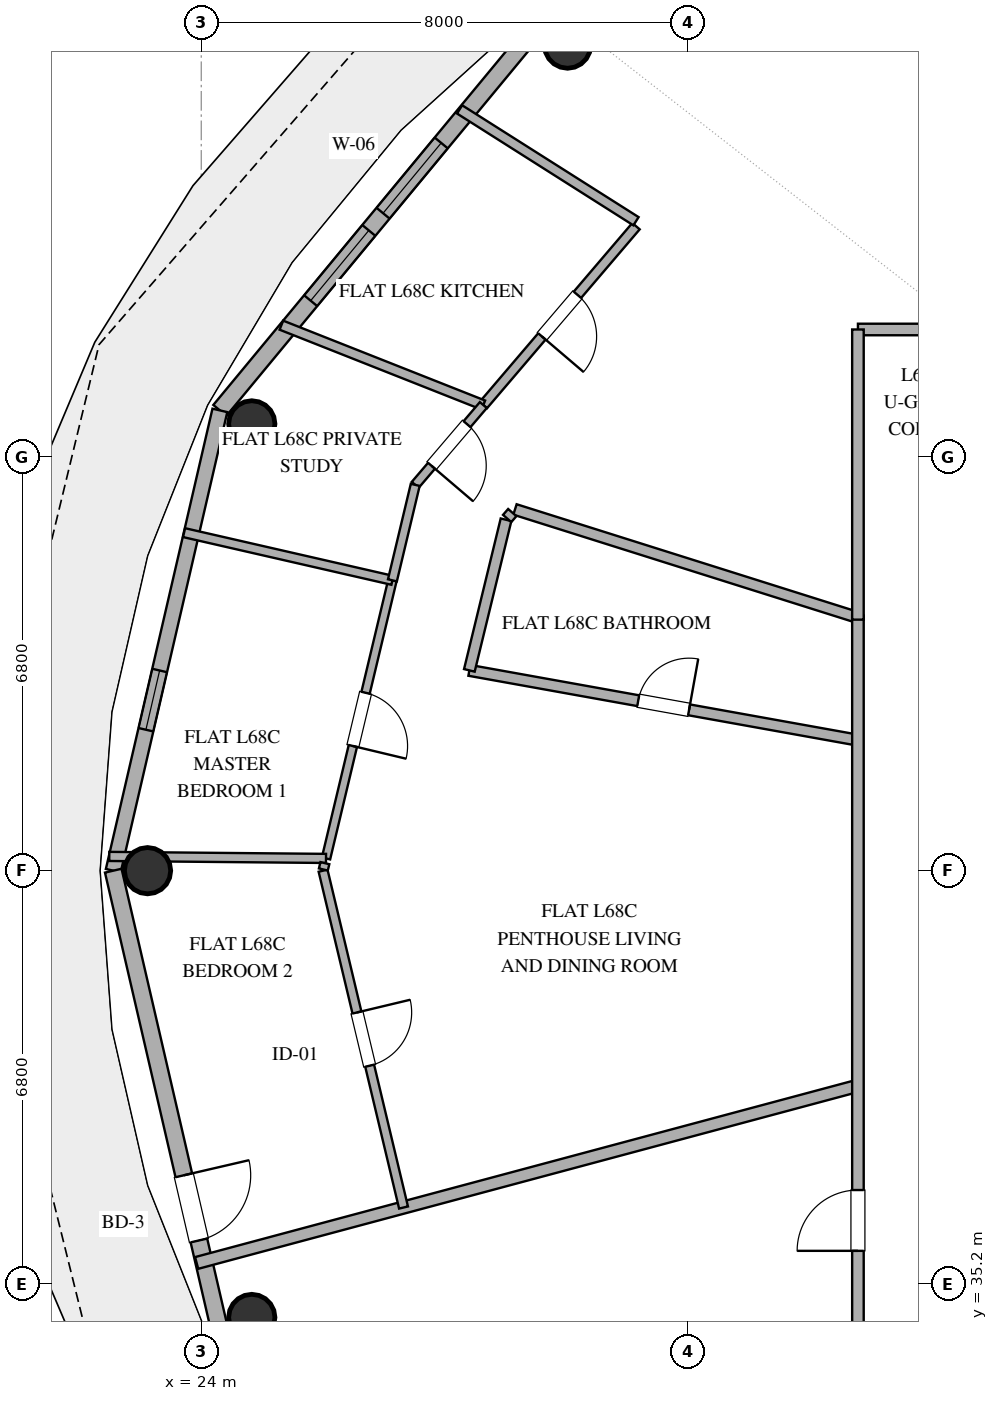
"""IFC4 building model, lengths in metres.
Left out: names, types, materials, properties, quantities, classifications, styles, units other than length and angle.
Written with IfcOpenShell. Run it as: python <this file> out.ifc"""

import sys

from ifc_helpers import new_model, si_unit, direction, frame, frame_2d, origin, origin_2d, place, context, subcontext, project, spatial, rectangle, hollow_circle, extrude, element, fill, save


model = new_model("IFC4")
c1 = context("Model", 3, precision=1e-05, world=origin(), true_north=direction((0.0, 1.0)))
c2 = subcontext(c1, "Body", "Model", "MODEL_VIEW")
j1 = project(units=[si_unit("LENGTHUNIT", "METRE"), si_unit("PLANEANGLEUNIT", "RADIAN")], contexts=[c1])
p1 = place(None, origin())
s1 = spatial("IfcSite", under=j1, at=p1, CompositionType="ELEMENT")
p2 = place(p1, origin())
s2 = spatial("IfcBuilding", under=s1, at=p2, CompositionType="ELEMENT")
p3 = place(p2, frame((0.0, 0.0, 265.8)))
s3 = spatial("IfcBuildingStorey", under=s2, at=p3, CompositionType="ELEMENT", Elevation=265.8)
for number, where, z_axis, x_axis in (
    (1, (30.025, 55.576, 0.0), (0.0, 0.0, 1.0), (1.0, 0.0, 0.0)),
    (2, (24.831, 49.347, 0.0), (0.0, 0.0, 1.0), (1.0, 0.0, 0.0)),
    (3, (23.117, 42.0, 0.0), (0.0, 0.0, 1.0), (1.0, 0.0, 0.0)),
    (4, (24.831, 34.653, 0.0), (0.0, 0.0, 1.0), (1.0, 0.0, 0.0)),
):
    element("IfcColumn", number, at=place(p3, frame(where, z_axis=z_axis, x_axis=x_axis)), inside=s3, PredefinedType="COLUMN", context=c2, shape_type="SweptSolid", body=[
        extrude(hollow_circle(Radius=0.381, WallThickness=0.025, at=origin_2d()), origin(), (0.0, 0.0, 1.0), 3.37),
    ])
p4 = place(p3, frame((29.617, 55.987, 0.0), z_axis=(0.0, 0.0, 1.0), x_axis=(-0.63761509934, -0.770355103243, 0.0)))
e5 = element("IfcWall", 5, at=p4, inside=s3, PredefinedType="SOLIDWALL", context=c2, shape_type="SweptSolid", body=[
    extrude(rectangle(XDim=8.33, YDim=0.28, at=frame_2d((4.165, 0.0))), origin(), (0.0, 0.0, 1.0), 3.37),
])
p5 = place(p4, frame((2.621, 0.0, 0.85)))
e6 = element("IfcOpeningElement", 6, at=p5, cuts=e5, PredefinedType="OPENING", context=c2, shape_type="SweptSolid", body=[
    extrude(rectangle(XDim=1.5, YDim=2.0, at=frame_2d((0.75, 1.0))), frame((0.0, 0.15, 0.0), z_axis=(0.0, -1.0, 0.0), x_axis=(1.0, 0.0, 0.0)), (0.0, 0.0, 1.0), 0.3),
])
p6 = place(p4, frame((4.488, 0.0, 0.85)))
e7 = element("IfcOpeningElement", 7, at=p6, cuts=e5, PredefinedType="OPENING", context=c2, shape_type="SweptSolid", body=[
    extrude(rectangle(XDim=1.5, YDim=2.0, at=frame_2d((0.75, 1.0))), frame((0.0, 0.15, 0.0), z_axis=(0.0, -1.0, 0.0), x_axis=(1.0, 0.0, 0.0)), (0.0, 0.0, 1.0), 0.3),
])
p7 = place(p3, frame((24.306, 49.57, 0.0), z_axis=(0.0, 0.0, 1.0), x_axis=(-0.225635078214, -0.974211892495, 0.0)))
e8 = element("IfcWall", 8, at=p7, inside=s3, PredefinedType="SOLIDWALL", context=c2, shape_type="SweptSolid", body=[
    extrude(rectangle(XDim=7.77, YDim=0.25, at=frame_2d((3.885, 0.0))), origin(), (0.0, 0.0, 1.0), 3.37),
])
p8 = place(p7, frame((4.391, 0.0, 0.35)))
e9 = element("IfcOpeningElement", 9, at=p8, cuts=e8, PredefinedType="OPENING", context=c2, shape_type="SweptSolid", body=[
    extrude(rectangle(XDim=1.0, YDim=1.05, at=frame_2d((0.5, 0.525))), frame((0.0, 0.135, 0.0), z_axis=(0.0, -1.0, 0.0), x_axis=(1.0, 0.0, 0.0)), (0.0, 0.0, 1.0), 0.27),
])
p9 = place(p3, frame((22.553, 42.0, 0.0), z_axis=(0.0, 0.0, 1.0), x_axis=(0.225635078214, -0.974211892495, 0.0)))
e10 = element("IfcWall", 10, at=p9, inside=s3, PredefinedType="SOLIDWALL", context=c2, shape_type="SweptSolid", body=[
    extrude(rectangle(XDim=7.77, YDim=0.28, at=frame_2d((3.885, 0.0))), origin(), (0.0, 0.0, 1.0), 3.37),
])
p10 = place(p9, frame((5.142, 0.0, 0.0)))
e11 = element("IfcOpeningElement", 11, at=p10, cuts=e10, PredefinedType="OPENING", context=c2, shape_type="SweptSolid", body=[
    extrude(rectangle(XDim=1.1, YDim=2.25, at=frame_2d((0.55, 1.125))), frame((0.0, 0.15, 0.0), z_axis=(0.0, -1.0, 0.0), x_axis=(1.0, 0.0, 0.0)), (0.0, 0.0, 1.0), 0.3),
])
p11 = place(p3, frame((34.8, 50.9, 0.0), z_axis=(0.0, 0.0, 1.0), x_axis=(1.0, 0.0, 0.0)))
e12 = element("IfcWall", 12, at=p11, inside=s3, PredefinedType="PARTITIONING", context=c2, shape_type="SweptSolid", body=[
    extrude(rectangle(XDim=16.473, YDim=0.19, at=frame_2d((8.237, 0.0))), origin(), (0.0, 0.0, 1.0), 2.73),
])
p12 = place(p11, frame((10.196, 0.0, 0.0)))
e13 = element("IfcOpeningElement", 13, at=p12, cuts=e12, PredefinedType="OPENING", context=c2, shape_type="SweptSolid", body=[
    extrude(rectangle(XDim=1.0, YDim=2.2, at=frame_2d((0.5, 1.1))), frame((0.0, 0.105, 0.0), z_axis=(0.0, -1.0, 0.0), x_axis=(1.0, 0.0, 0.0)), (0.0, 0.0, 1.0), 0.21),
])
p13 = place(p11, frame((2.387, 0.0, 0.0)))
e14 = element("IfcOpeningElement", 14, at=p13, cuts=e12, PredefinedType="OPENING", context=c2, shape_type="SweptSolid", body=[
    extrude(rectangle(XDim=1.0, YDim=2.2, at=frame_2d((0.5, 1.1))), frame((0.0, 0.105, 0.0), z_axis=(0.0, -1.0, 0.0), x_axis=(1.0, 0.0, 0.0)), (0.0, 0.0, 1.0), 0.21),
])
p14 = place(p3, frame((23.924, 35.549, 0.0), z_axis=(0.0, 0.0, 1.0), x_axis=(0.965923661364, 0.258827124578, 0.0)))
e15 = element("IfcWall", 15, at=p14, inside=s3, PredefinedType="PARTITIONING", context=c2, shape_type="SweptSolid", body=[
    extrude(rectangle(XDim=11.26, YDim=0.2, at=frame_2d((5.63, 0.0))), origin(), (0.0, 0.0, 1.0), 2.73),
])
p15 = place(p3, frame((28.409, 45.294, 0.0), z_axis=(0.0, 0.0, 1.0), x_axis=(0.984253263435, -0.176764004867, 0.0)))
e16 = element("IfcWall", 16, at=p15, inside=s3, PredefinedType="PLUMBINGWALL", context=c2, shape_type="SweptSolid", body=[
    extrude(rectangle(XDim=6.493, YDim=0.18, at=frame_2d((3.247, 0.0))), origin(), (0.0, 0.0, 1.0), 2.73),
])
p16 = place(p15, frame((2.821, 0.0, 0.0)))
e17 = element("IfcOpeningElement", 17, at=p16, cuts=e16, PredefinedType="OPENING", context=c2, shape_type="SweptSolid", body=[
    extrude(rectangle(XDim=0.85, YDim=2.1, at=frame_2d((0.425, 1.05))), frame((0.0, 0.1, 0.0), z_axis=(0.0, -1.0, 0.0), x_axis=(1.0, 0.0, 0.0)), (0.0, 0.0, 1.0), 0.2),
])
p17 = place(p3, frame((40.532, 50.9, 0.0), z_axis=(0.0, 0.0, 1.0), x_axis=(-0.642777155779, 0.766053214868, 0.0)))
e18 = element("IfcWall", 18, at=p17, inside=s3, PredefinedType="PARTITIONING", context=c2, shape_type="SweptSolid", body=[
    extrude(rectangle(XDim=9.868, YDim=0.2, at=frame_2d((4.934, 0.0))), origin(), (0.0, 0.0, 1.0), 2.73),
])
p18 = place(p3, frame((34.8, 46.162, 0.0), z_axis=(0.0, 0.0, 1.0), x_axis=(-0.953717336958, 0.3007045746, 0.0)))
e19 = element("IfcWall", 19, at=p18, inside=s3, PredefinedType="PLUMBINGWALL", context=c2, shape_type="SweptSolid", body=[
    extrude(rectangle(XDim=5.914, YDim=0.18, at=frame_2d((2.957, 0.0))), origin(), (0.0, 0.0, 1.0), 2.73),
])
p19 = place(p3, frame((34.8, 34.0, 0.0), z_axis=(0.0, 0.0, 1.0), x_axis=(0.0, 1.0, 0.0)))
e20 = element("IfcWall", 20, at=p19, inside=s3, PredefinedType="PARTITIONING", context=c2, shape_type="SweptSolid", body=[
    extrude(rectangle(XDim=12.196, YDim=0.19, at=frame_2d((6.098, 0.0))), origin(), (0.0, 0.0, 1.0), 2.73),
])
p20 = place(p19, frame((1.748, 0.0, 0.0)))
e21 = element("IfcOpeningElement", 21, at=p20, cuts=e20, PredefinedType="OPENING", context=c2, shape_type="SweptSolid", body=[
    extrude(rectangle(XDim=1.0, YDim=2.2, at=frame_2d((0.5, 1.1))), frame((0.0, 0.105, 0.0), z_axis=(0.0, -1.0, 0.0), x_axis=(1.0, 0.0, 0.0)), (0.0, 0.0, 1.0), 0.21),
])
p21 = place(p3, frame((26.004, 42.0, 0.0), z_axis=(0.0, 0.0, 1.0), x_axis=(0.232304342064, -0.972643147644, 0.0)))
e22 = element("IfcWall", 22, at=p21, inside=s3, PredefinedType="PARTITIONING", context=c2, shape_type="SweptSolid", body=[
    extrude(rectangle(XDim=5.695, YDim=0.15, at=frame_2d((2.848, 0.0))), origin(), (0.0, 0.0, 1.0), 2.73),
])
p22 = place(p21, frame((2.398, 0.0, 0.0)))
e23 = element("IfcOpeningElement", 23, at=p22, cuts=e22, PredefinedType="OPENING", context=c2, shape_type="SweptSolid", body=[
    extrude(rectangle(XDim=0.9, YDim=2.1, at=frame_2d((0.45, 1.05))), frame((0.0, 0.085, 0.0), z_axis=(0.0, -1.0, 0.0), x_axis=(1.0, 0.0, 0.0)), (0.0, 0.0, 1.0), 0.17),
])
p23 = place(p3, frame((34.8, 46.128, 0.0), z_axis=(0.0, 0.0, 1.0), x_axis=(0.0, 1.0, 0.0)))
e24 = element("IfcWall", 24, at=p23, inside=s3, PredefinedType="PARTITIONING", context=c2, shape_type="SweptSolid", body=[
    extrude(rectangle(XDim=4.771, YDim=0.19, at=frame_2d((2.386, 0.0))), origin(), (0.0, 0.0, 1.0), 2.73),
])
p24 = place(p3, frame((27.144, 46.775, 0.0), z_axis=(0.0, 0.0, 1.0), x_axis=(-0.232320140936, -0.972639374134, 0.0)))
e25 = element("IfcWall", 25, at=p24, inside=s3, PredefinedType="PARTITIONING", context=c2, shape_type="SweptSolid", body=[
    extrude(rectangle(XDim=4.702, YDim=0.14, at=frame_2d((2.351, 0.0))), origin(), (0.0, 0.0, 1.0), 2.73),
])
p25 = place(p24, frame((1.901, 0.0, 0.0)))
e26 = element("IfcOpeningElement", 26, at=p25, cuts=e25, PredefinedType="OPENING", context=c2, shape_type="SweptSolid", body=[
    extrude(rectangle(XDim=0.9, YDim=2.1, at=frame_2d((0.45, 1.05))), frame((0.0, 0.08, 0.0), z_axis=(0.0, -1.0, 0.0), x_axis=(1.0, 0.0, 0.0)), (0.0, 0.0, 1.0), 0.16),
])
p26 = place(p3, frame((31.15, 52.599, 0.0), z_axis=(0.0, 0.0, 1.0), x_axis=(-0.649199141965, -0.760618481285, 0.0)))
e27 = element("IfcWall", 27, at=p26, inside=s3, PredefinedType="PLUMBINGWALL", context=c2, shape_type="SweptSolid", body=[
    extrude(rectangle(XDim=3.867, YDim=0.16, at=frame_2d((1.934, 0.0))), origin(), (0.0, 0.0, 1.0), 2.73),
])
p27 = place(p26, frame((1.484, 0.0, 0.0)))
e28 = element("IfcOpeningElement", 28, at=p27, cuts=e27, PredefinedType="OPENING", context=c2, shape_type="SweptSolid", body=[
    extrude(rectangle(XDim=0.9, YDim=2.1, at=frame_2d((0.45, 1.05))), frame((0.0, 0.09, 0.0), z_axis=(0.0, -1.0, 0.0), x_axis=(1.0, 0.0, 0.0)), (0.0, 0.0, 1.0), 0.18),
])
p28 = place(p3, frame((25.318, 50.971, 0.0), z_axis=(0.0, 0.0, 1.0), x_axis=(0.929912335167, -0.36778125143, 0.0)))
e29 = element("IfcWall", 29, at=p28, inside=s3, PredefinedType="PLUMBINGWALL", context=c2, shape_type="SweptSolid", body=[
    extrude(rectangle(XDim=3.571, YDim=0.16, at=frame_2d((1.786, 0.0))), origin(), (0.0, 0.0, 1.0), 2.73),
])
p29 = place(p3, frame((22.487, 42.234, 0.0), z_axis=(0.0, 0.0, 1.0), x_axis=(0.999957889833, -0.009177067135, 0.0)))
e30 = element("IfcWall", 30, at=p29, inside=s3, PredefinedType="PARTITIONING", context=c2, shape_type="SweptSolid", body=[
    extrude(rectangle(XDim=3.565, YDim=0.15, at=frame_2d((1.782, 0.0))), origin(), (0.0, 0.0, 1.0), 2.73),
])
p30 = place(p3, frame((23.717, 47.559, 0.0), z_axis=(0.0, 0.0, 1.0), x_axis=(0.974786474408, -0.223139708056, 0.0)))
e31 = element("IfcWall", 31, at=p30, inside=s3, PredefinedType="PARTITIONING", context=c2, shape_type="SweptSolid", body=[
    extrude(rectangle(XDim=3.515, YDim=0.15, at=frame_2d((1.758, 0.0))), origin(), (0.0, 0.0, 1.0), 2.73),
])
p31 = place(p3, frame((28.249, 54.519, 0.0), z_axis=(0.0, 0.0, 1.0), x_axis=(0.844643402302, -0.535329359318, 0.0)))
e32 = element("IfcWall", 32, at=p31, inside=s3, PredefinedType="PLUMBINGWALL", context=c2, shape_type="SweptSolid", body=[
    extrude(rectangle(XDim=3.435, YDim=0.16, at=frame_2d((1.718, 0.0))), origin(), (0.0, 0.0, 1.0), 2.73),
])
p32 = place(p3, frame((29.012, 47.771, 0.0), z_axis=(0.0, 0.0, 1.0), x_axis=(-0.236537291112, -0.971622411183, 0.0)))
e33 = element("IfcWall", 33, at=p32, inside=s3, PredefinedType="PLUMBINGWALL", context=c2, shape_type="SweptSolid", body=[
    extrude(rectangle(XDim=2.549, YDim=0.18, at=frame_2d((1.275, 0.0))), origin(), (0.0, 0.0, 1.0), 2.73),
])
p33 = place(p3, frame((28.639, 49.657, 0.0), z_axis=(0.0, 0.0, 1.0), x_axis=(-0.649228439324, -0.760593474579, 0.0)))
e34 = element("IfcWall", 34, at=p33, inside=s3, PredefinedType="PARTITIONING", context=c2, shape_type="SweptSolid", body=[
    extrude(rectangle(XDim=1.725, YDim=0.15, at=frame_2d((0.863, 0.0))), origin(), (0.0, 0.0, 1.0), 2.73),
])
p34 = place(p33, frame((0.413, 0.0, 0.0)))
e35 = element("IfcOpeningElement", 35, at=p34, cuts=e34, PredefinedType="OPENING", context=c2, shape_type="SweptSolid", body=[
    extrude(rectangle(XDim=0.9, YDim=2.1, at=frame_2d((0.45, 1.05))), frame((0.0, 0.085, 0.0), z_axis=(0.0, -1.0, 0.0), x_axis=(1.0, 0.0, 0.0)), (0.0, 0.0, 1.0), 0.17),
])
p35 = place(p3, frame((27.519, 48.345, 0.0), z_axis=(0.0, 0.0, 1.0), x_axis=(-0.232274682056, -0.972650231109, 0.0)))
e36 = element("IfcWall", 36, at=p35, inside=s3, PredefinedType="PARTITIONING", context=c2, shape_type="SweptSolid", body=[
    extrude(rectangle(XDim=1.615, YDim=0.15, at=frame_2d((0.807, 0.0))), origin(), (0.0, 0.0, 1.0), 2.73),
])
p36 = place(p3, frame((29.115, 47.889, 0.0), z_axis=(0.0, 0.0, 1.0), x_axis=(-0.657024535632, -0.753869192618, 0.0)))
e37 = element("IfcWall", 37, at=p36, inside=s3, PredefinedType="PLUMBINGWALL", context=c2, shape_type="SweptSolid", body=[
    extrude(rectangle(XDim=0.129, YDim=0.18, at=frame_2d((0.064, 0.0))), origin(), (0.0, 0.0, 1.0), 2.73),
])
p37 = place(p3, frame((26.033, 42.124, 0.0), z_axis=(0.0, 0.0, 1.0), x_axis=(-0.232339008139, -0.972634867407, 0.0)))
e38 = element("IfcWall", 38, at=p37, inside=s3, PredefinedType="PARTITIONING", context=c2, shape_type="SweptSolid", body=[
    extrude(rectangle(XDim=0.107, YDim=0.15, at=frame_2d((0.054, 0.0))), origin(), (0.0, 0.0, 1.0), 2.73),
])
p38 = place(p5, origin())
e39 = element("IfcWindow", 39, at=p38, inside=s3, PartitioningType="SINGLE_PANEL", PredefinedType="WINDOW", context=c2, shape_type="SweptSolid", body=[
    extrude(rectangle(XDim=1.5, YDim=2.0, at=frame_2d((0.75, 1.0))), frame((0.0, 0.03, 0.0), z_axis=(0.0, -1.0, 0.0), x_axis=(1.0, 0.0, 0.0)), (0.0, 0.0, 1.0), 0.06),
])
fill(e6, e39)
p39 = place(p6, origin())
e40 = element("IfcWindow", 40, at=p39, inside=s3, PartitioningType="SINGLE_PANEL", PredefinedType="WINDOW", context=c2, shape_type="SweptSolid", body=[
    extrude(rectangle(XDim=1.5, YDim=2.0, at=frame_2d((0.75, 1.0))), frame((0.0, 0.03, 0.0), z_axis=(0.0, -1.0, 0.0), x_axis=(1.0, 0.0, 0.0)), (0.0, 0.0, 1.0), 0.06),
])
fill(e7, e40)
p40 = place(p10, origin())
e41 = element("IfcDoor", 41, at=p40, inside=s3, OperationType="SINGLE_SWING_LEFT", PredefinedType="DOOR", context=c2, shape_type="SweptSolid", body=[
    extrude(rectangle(XDim=1.1, YDim=2.25, at=frame_2d((0.55, 1.125))), frame((0.0, 0.025, 0.0), z_axis=(0.0, -1.0, 0.0), x_axis=(1.0, 0.0, 0.0)), (0.0, 0.0, 1.0), 0.05),
])
fill(e11, e41)
p41 = place(p8, origin())
e42 = element("IfcWindow", 42, at=p41, inside=s3, PartitioningType="SINGLE_PANEL", PredefinedType="WINDOW", context=c2, shape_type="SweptSolid", body=[
    extrude(rectangle(XDim=1.0, YDim=1.05, at=frame_2d((0.5, 0.525))), frame((0.0, 0.03, 0.0), z_axis=(0.0, -1.0, 0.0), x_axis=(1.0, 0.0, 0.0)), (0.0, 0.0, 1.0), 0.06),
])
fill(e9, e42)
p42 = place(p16, origin())
e43 = element("IfcDoor", 43, at=p42, inside=s3, OperationType="SINGLE_SWING_RIGHT", PredefinedType="DOOR", context=c2, shape_type="SweptSolid", body=[
    extrude(rectangle(XDim=0.85, YDim=2.1, at=frame_2d((0.425, 1.05))), frame((0.0, 0.025, 0.0), z_axis=(0.0, -1.0, 0.0), x_axis=(1.0, 0.0, 0.0)), (0.0, 0.0, 1.0), 0.05),
])
fill(e17, e43)
p43 = place(p20, origin())
e44 = element("IfcDoor", 44, at=p43, inside=s3, OperationType="SINGLE_SWING_LEFT", PredefinedType="DOOR", context=c2, shape_type="SweptSolid", body=[
    extrude(rectangle(XDim=1.0, YDim=2.2, at=frame_2d((0.5, 1.1))), frame((0.0, 0.025, 0.0), z_axis=(0.0, -1.0, 0.0), x_axis=(1.0, 0.0, 0.0)), (0.0, 0.0, 1.0), 0.05),
])
fill(e21, e44)
p44 = place(p22, origin())
e45 = element("IfcDoor", 45, at=p44, inside=s3, OperationType="SINGLE_SWING_LEFT", PredefinedType="DOOR", context=c2, shape_type="SweptSolid", body=[
    extrude(rectangle(XDim=0.9, YDim=2.1, at=frame_2d((0.45, 1.05))), frame((0.0, 0.025, 0.0), z_axis=(0.0, -1.0, 0.0), x_axis=(1.0, 0.0, 0.0)), (0.0, 0.0, 1.0), 0.05),
])
fill(e23, e45)
p45 = place(p25, origin())
e46 = element("IfcDoor", 46, at=p45, inside=s3, OperationType="SINGLE_SWING_RIGHT", PredefinedType="DOOR", context=c2, shape_type="SweptSolid", body=[
    extrude(rectangle(XDim=0.9, YDim=2.1, at=frame_2d((0.45, 1.05))), frame((0.0, 0.025, 0.0), z_axis=(0.0, -1.0, 0.0), x_axis=(1.0, 0.0, 0.0)), (0.0, 0.0, 1.0), 0.05),
])
fill(e26, e46)
p46 = place(p27, origin())
e47 = element("IfcDoor", 47, at=p46, inside=s3, OperationType="SINGLE_SWING_RIGHT", PredefinedType="DOOR", context=c2, shape_type="SweptSolid", body=[
    extrude(rectangle(XDim=0.9, YDim=2.1, at=frame_2d((0.45, 1.05))), frame((0.0, 0.025, 0.0), z_axis=(0.0, -1.0, 0.0), x_axis=(1.0, 0.0, 0.0)), (0.0, 0.0, 1.0), 0.05),
])
fill(e28, e47)
p47 = place(p34, origin())
e48 = element("IfcDoor", 48, at=p47, inside=s3, OperationType="SINGLE_SWING_RIGHT", PredefinedType="DOOR", context=c2, shape_type="SweptSolid", body=[
    extrude(rectangle(XDim=0.9, YDim=2.1, at=frame_2d((0.45, 1.05))), frame((0.0, 0.025, 0.0), z_axis=(0.0, -1.0, 0.0), x_axis=(1.0, 0.0, 0.0)), (0.0, 0.0, 1.0), 0.05),
])
fill(e35, e48)
save(model, sys.argv[1])
